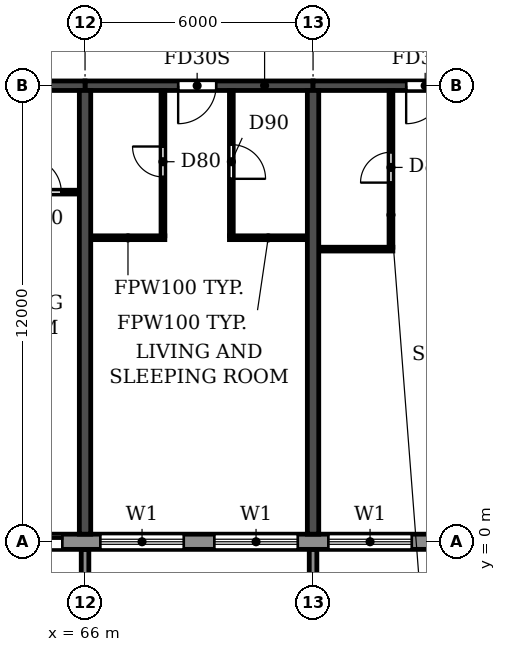
"""IFC4 building model, lengths in metres.
Left out: names, types, materials, properties, quantities, classifications, styles, units other than length and angle.
Written with IfcOpenShell. Run it as: python <this file> out.ifc"""

import sys

from ifc_helpers import new_model, si_unit, direction, frame, frame_2d, origin, place, context, subcontext, project, spatial, polyline, rectangle, outline, extrude, source, transform, mapped, element, fill, save


model = new_model("IFC4")
c1 = context("Model", 3, precision=1e-05, world=origin(), true_north=direction((0.0, 1.0)))
c2 = subcontext(c1, "Body", "Model", "MODEL_VIEW")
j1 = project(units=[si_unit("LENGTHUNIT", "METRE"), si_unit("PLANEANGLEUNIT", "RADIAN")], contexts=[c1])
p1 = place(None, origin())
s1 = spatial("IfcSite", under=j1, at=p1, CompositionType="ELEMENT")
p2 = place(p1, origin())
s2 = spatial("IfcBuilding", under=s1, at=p2, CompositionType="ELEMENT")
p3 = place(p2, frame((0.0, 0.0, 155.4)))
s3 = spatial("IfcBuildingStorey", under=s2, at=p3, CompositionType="ELEMENT", Elevation=155.4)
for number, where, z_axis, x_axis in (
    (1, (66.0, 0.2, 0.0), (0.0, 0.0, 1.0), (0.0, 1.0, 0.0)),
    (2, (72.0, 0.2, 0.0), (0.0, 0.0, 1.0), (0.0, 1.0, 0.0)),
):
    element("IfcWall", number, at=place(p3, frame(where, z_axis=z_axis, x_axis=x_axis)), inside=s3, PredefinedType="SHEAR", context=c2, shape_type="SweptSolid", body=[
        extrude(rectangle(XDim=11.675, YDim=0.3, at=frame_2d((5.837, 0.0))), origin(), (0.0, 0.0, 1.0), 3.0),
    ])
p4 = place(p3, frame((60.0, 12.0, 0.0), z_axis=(0.0, 0.0, 1.0), x_axis=(1.0, 0.0, 0.0)))
e3 = element("IfcWall", 3, at=p4, inside=s3, PredefinedType="SHEAR", context=c2, shape_type="SweptSolid", body=[
    extrude(rectangle(XDim=6.0, YDim=0.25, at=frame_2d((3.0, 0.0))), origin(), (0.0, 0.0, 1.0), 2.4),
])
p5 = place(p4, frame((2.45, 0.0, 0.0)))
e4 = element("IfcOpeningElement", 4, at=p5, cuts=e3, PredefinedType="OPENING", context=c2, shape_type="SweptSolid", body=[
    extrude(rectangle(XDim=1.0, YDim=2.1, at=frame_2d((0.5, 1.05))), frame((0.0, 0.135, 0.0), z_axis=(0.0, -1.0, 0.0), x_axis=(1.0, 0.0, 0.0)), (0.0, 0.0, 1.0), 0.27),
])
p6 = place(p3, frame((66.0, 12.0, 0.0), z_axis=(0.0, 0.0, 1.0), x_axis=(1.0, 0.0, 0.0)))
e5 = element("IfcWall", 5, at=p6, inside=s3, PredefinedType="SHEAR", context=c2, shape_type="SweptSolid", body=[
    extrude(rectangle(XDim=6.0, YDim=0.25, at=frame_2d((3.0, 0.0))), origin(), (0.0, 0.0, 1.0), 2.4),
])
p7 = place(p6, frame((2.45, 0.0, 0.0)))
e6 = element("IfcOpeningElement", 6, at=p7, cuts=e5, PredefinedType="OPENING", context=c2, shape_type="SweptSolid", body=[
    extrude(rectangle(XDim=1.0, YDim=2.1, at=frame_2d((0.5, 1.05))), frame((0.0, 0.135, 0.0), z_axis=(0.0, -1.0, 0.0), x_axis=(1.0, 0.0, 0.0)), (0.0, 0.0, 1.0), 0.27),
])
p8 = place(p3, frame((72.0, 12.0, 0.0), z_axis=(0.0, 0.0, 1.0), x_axis=(1.0, 0.0, 0.0)))
e7 = element("IfcWall", 7, at=p8, inside=s3, PredefinedType="SHEAR", context=c2, shape_type="SweptSolid", body=[
    extrude(rectangle(XDim=6.0, YDim=0.25, at=frame_2d((3.0, 0.0))), origin(), (0.0, 0.0, 1.0), 2.4),
])
p9 = place(p8, frame((2.45, 0.0, 0.0)))
e8 = element("IfcOpeningElement", 8, at=p9, cuts=e7, PredefinedType="OPENING", context=c2, shape_type="SweptSolid", body=[
    extrude(rectangle(XDim=1.0, YDim=2.1, at=frame_2d((0.5, 1.05))), frame((0.0, 0.135, 0.0), z_axis=(0.0, -1.0, 0.0), x_axis=(1.0, 0.0, 0.0)), (0.0, 0.0, 1.0), 0.27),
])
p10 = place(p3, frame((16.683, 0.0, 0.0), z_axis=(0.0, 0.0, 1.0), x_axis=(1.0, 0.0, 0.0)))
e9 = element("IfcWall", 9, at=p10, inside=s3, PredefinedType="STANDARD", context=c2, shape_type="SweptSolid", body=[
    extrude(rectangle(XDim=68.634, YDim=0.4, at=frame_2d((34.317, 0.0))), origin(), (0.0, 0.0, 1.0), 3.0),
])
p11 = place(p10, frame((1.717, 0.0, 0.9)))
e10 = element("IfcOpeningElement", 10, at=p11, cuts=e9, PredefinedType="OPENING", context=c2, shape_type="SweptSolid", body=[
    extrude(rectangle(XDim=2.2, YDim=1.5, at=frame_2d((1.1, 0.75))), frame((0.0, 0.21, 0.0), z_axis=(0.0, -1.0, 0.0), x_axis=(1.0, 0.0, 0.0)), (0.0, 0.0, 1.0), 0.42),
])
p12 = place(p10, frame((4.717, 0.0, 0.9)))
e11 = element("IfcOpeningElement", 11, at=p12, cuts=e9, PredefinedType="OPENING", context=c2, shape_type="SweptSolid", body=[
    extrude(rectangle(XDim=2.2, YDim=1.5, at=frame_2d((1.1, 0.75))), frame((0.0, 0.21, 0.0), z_axis=(0.0, -1.0, 0.0), x_axis=(1.0, 0.0, 0.0)), (0.0, 0.0, 1.0), 0.42),
])
p13 = place(p10, frame((7.917, 0.0, 0.0)))
e12 = element("IfcOpeningElement", 12, at=p13, cuts=e9, PredefinedType="OPENING", context=c2, shape_type="SweptSolid", body=[
    extrude(rectangle(XDim=1.8, YDim=2.4, at=frame_2d((0.9, 1.2))), frame((0.0, 0.21, 0.0), z_axis=(0.0, -1.0, 0.0), x_axis=(1.0, 0.0, 0.0)), (0.0, 0.0, 1.0), 0.42),
])
p14 = place(p10, frame((10.717, 0.0, 0.9)))
e13 = element("IfcOpeningElement", 13, at=p14, cuts=e9, PredefinedType="OPENING", context=c2, shape_type="SweptSolid", body=[
    extrude(rectangle(XDim=2.2, YDim=1.5, at=frame_2d((1.1, 0.75))), frame((0.0, 0.21, 0.0), z_axis=(0.0, -1.0, 0.0), x_axis=(1.0, 0.0, 0.0)), (0.0, 0.0, 1.0), 0.42),
])
p15 = place(p10, frame((13.717, 0.0, 0.9)))
e14 = element("IfcOpeningElement", 14, at=p15, cuts=e9, PredefinedType="OPENING", context=c2, shape_type="SweptSolid", body=[
    extrude(rectangle(XDim=2.2, YDim=1.5, at=frame_2d((1.1, 0.75))), frame((0.0, 0.21, 0.0), z_axis=(0.0, -1.0, 0.0), x_axis=(1.0, 0.0, 0.0)), (0.0, 0.0, 1.0), 0.42),
])
p16 = place(p10, frame((16.717, 0.0, 0.9)))
e15 = element("IfcOpeningElement", 15, at=p16, cuts=e9, PredefinedType="OPENING", context=c2, shape_type="SweptSolid", body=[
    extrude(rectangle(XDim=2.2, YDim=1.5, at=frame_2d((1.1, 0.75))), frame((0.0, 0.21, 0.0), z_axis=(0.0, -1.0, 0.0), x_axis=(1.0, 0.0, 0.0)), (0.0, 0.0, 1.0), 0.42),
])
p17 = place(p10, frame((19.717, 0.0, 0.9)))
e16 = element("IfcOpeningElement", 16, at=p17, cuts=e9, PredefinedType="OPENING", context=c2, shape_type="SweptSolid", body=[
    extrude(rectangle(XDim=2.2, YDim=1.5, at=frame_2d((1.1, 0.75))), frame((0.0, 0.21, 0.0), z_axis=(0.0, -1.0, 0.0), x_axis=(1.0, 0.0, 0.0)), (0.0, 0.0, 1.0), 0.42),
])
p18 = place(p10, frame((22.917, 0.0, 0.0)))
e17 = element("IfcOpeningElement", 17, at=p18, cuts=e9, PredefinedType="OPENING", context=c2, shape_type="SweptSolid", body=[
    extrude(rectangle(XDim=1.8, YDim=2.4, at=frame_2d((0.9, 1.2))), frame((0.0, 0.21, 0.0), z_axis=(0.0, -1.0, 0.0), x_axis=(1.0, 0.0, 0.0)), (0.0, 0.0, 1.0), 0.42),
])
p19 = place(p10, frame((25.717, 0.0, 0.9)))
e18 = element("IfcOpeningElement", 18, at=p19, cuts=e9, PredefinedType="OPENING", context=c2, shape_type="SweptSolid", body=[
    extrude(rectangle(XDim=2.2, YDim=1.5, at=frame_2d((1.1, 0.75))), frame((0.0, 0.21, 0.0), z_axis=(0.0, -1.0, 0.0), x_axis=(1.0, 0.0, 0.0)), (0.0, 0.0, 1.0), 0.42),
])
p20 = place(p10, frame((28.717, 0.0, 0.9)))
e19 = element("IfcOpeningElement", 19, at=p20, cuts=e9, PredefinedType="OPENING", context=c2, shape_type="SweptSolid", body=[
    extrude(rectangle(XDim=2.2, YDim=1.5, at=frame_2d((1.1, 0.75))), frame((0.0, 0.21, 0.0), z_axis=(0.0, -1.0, 0.0), x_axis=(1.0, 0.0, 0.0)), (0.0, 0.0, 1.0), 0.42),
])
p21 = place(p10, frame((31.917, 0.0, 0.0)))
e20 = element("IfcOpeningElement", 20, at=p21, cuts=e9, PredefinedType="OPENING", context=c2, shape_type="SweptSolid", body=[
    extrude(rectangle(XDim=1.8, YDim=2.4, at=frame_2d((0.9, 1.2))), frame((0.0, 0.21, 0.0), z_axis=(0.0, -1.0, 0.0), x_axis=(1.0, 0.0, 0.0)), (0.0, 0.0, 1.0), 0.42),
])
p22 = place(p10, frame((34.717, 0.0, 0.9)))
e21 = element("IfcOpeningElement", 21, at=p22, cuts=e9, PredefinedType="OPENING", context=c2, shape_type="SweptSolid", body=[
    extrude(rectangle(XDim=2.2, YDim=1.5, at=frame_2d((1.1, 0.75))), frame((0.0, 0.21, 0.0), z_axis=(0.0, -1.0, 0.0), x_axis=(1.0, 0.0, 0.0)), (0.0, 0.0, 1.0), 0.42),
])
p23 = place(p10, frame((37.717, 0.0, 0.9)))
e22 = element("IfcOpeningElement", 22, at=p23, cuts=e9, PredefinedType="OPENING", context=c2, shape_type="SweptSolid", body=[
    extrude(rectangle(XDim=2.2, YDim=1.5, at=frame_2d((1.1, 0.75))), frame((0.0, 0.21, 0.0), z_axis=(0.0, -1.0, 0.0), x_axis=(1.0, 0.0, 0.0)), (0.0, 0.0, 1.0), 0.42),
])
p24 = place(p10, frame((40.717, 0.0, 0.9)))
e23 = element("IfcOpeningElement", 23, at=p24, cuts=e9, PredefinedType="OPENING", context=c2, shape_type="SweptSolid", body=[
    extrude(rectangle(XDim=2.2, YDim=1.5, at=frame_2d((1.1, 0.75))), frame((0.0, 0.21, 0.0), z_axis=(0.0, -1.0, 0.0), x_axis=(1.0, 0.0, 0.0)), (0.0, 0.0, 1.0), 0.42),
])
p25 = place(p10, frame((43.717, 0.0, 0.9)))
e24 = element("IfcOpeningElement", 24, at=p25, cuts=e9, PredefinedType="OPENING", context=c2, shape_type="SweptSolid", body=[
    extrude(rectangle(XDim=2.2, YDim=1.5, at=frame_2d((1.1, 0.75))), frame((0.0, 0.21, 0.0), z_axis=(0.0, -1.0, 0.0), x_axis=(1.0, 0.0, 0.0)), (0.0, 0.0, 1.0), 0.42),
])
p26 = place(p10, frame((46.917, 0.0, 0.0)))
e25 = element("IfcOpeningElement", 25, at=p26, cuts=e9, PredefinedType="OPENING", context=c2, shape_type="SweptSolid", body=[
    extrude(rectangle(XDim=1.8, YDim=2.4, at=frame_2d((0.9, 1.2))), frame((0.0, 0.21, 0.0), z_axis=(0.0, -1.0, 0.0), x_axis=(1.0, 0.0, 0.0)), (0.0, 0.0, 1.0), 0.42),
])
p27 = place(p10, frame((49.717, 0.0, 0.9)))
e26 = element("IfcOpeningElement", 26, at=p27, cuts=e9, PredefinedType="OPENING", context=c2, shape_type="SweptSolid", body=[
    extrude(rectangle(XDim=2.2, YDim=1.5, at=frame_2d((1.1, 0.75))), frame((0.0, 0.21, 0.0), z_axis=(0.0, -1.0, 0.0), x_axis=(1.0, 0.0, 0.0)), (0.0, 0.0, 1.0), 0.42),
])
p28 = place(p10, frame((52.717, 0.0, 0.9)))
e27 = element("IfcOpeningElement", 27, at=p28, cuts=e9, PredefinedType="OPENING", context=c2, shape_type="SweptSolid", body=[
    extrude(rectangle(XDim=2.2, YDim=1.5, at=frame_2d((1.1, 0.75))), frame((0.0, 0.21, 0.0), z_axis=(0.0, -1.0, 0.0), x_axis=(1.0, 0.0, 0.0)), (0.0, 0.0, 1.0), 0.42),
])
p29 = place(p10, frame((55.717, 0.0, 0.9)))
e28 = element("IfcOpeningElement", 28, at=p29, cuts=e9, PredefinedType="OPENING", context=c2, shape_type="SweptSolid", body=[
    extrude(rectangle(XDim=2.2, YDim=1.5, at=frame_2d((1.1, 0.75))), frame((0.0, 0.21, 0.0), z_axis=(0.0, -1.0, 0.0), x_axis=(1.0, 0.0, 0.0)), (0.0, 0.0, 1.0), 0.42),
])
p30 = place(p10, frame((58.917, 0.0, 0.0)))
e29 = element("IfcOpeningElement", 29, at=p30, cuts=e9, PredefinedType="OPENING", context=c2, shape_type="SweptSolid", body=[
    extrude(rectangle(XDim=1.8, YDim=2.4, at=frame_2d((0.9, 1.2))), frame((0.0, 0.21, 0.0), z_axis=(0.0, -1.0, 0.0), x_axis=(1.0, 0.0, 0.0)), (0.0, 0.0, 1.0), 0.42),
])
p31 = place(p10, frame((61.717, 0.0, 0.9)))
e30 = element("IfcOpeningElement", 30, at=p31, cuts=e9, PredefinedType="OPENING", context=c2, shape_type="SweptSolid", body=[
    extrude(rectangle(XDim=2.2, YDim=1.5, at=frame_2d((1.1, 0.75))), frame((0.0, 0.21, 0.0), z_axis=(0.0, -1.0, 0.0), x_axis=(1.0, 0.0, 0.0)), (0.0, 0.0, 1.0), 0.42),
])
p32 = place(p10, frame((64.717, 0.0, 0.9)))
e31 = element("IfcOpeningElement", 31, at=p32, cuts=e9, PredefinedType="OPENING", context=c2, shape_type="SweptSolid", body=[
    extrude(rectangle(XDim=2.2, YDim=1.5, at=frame_2d((1.1, 0.75))), frame((0.0, 0.21, 0.0), z_axis=(0.0, -1.0, 0.0), x_axis=(1.0, 0.0, 0.0)), (0.0, 0.0, 1.0), 0.42),
])
m1 = source(origin(), c2, "Body", "SweptSolid", [
    extrude(outline(polyline([(0.0, 0.0), (0.2, 0.0), (0.2, 1.65), (0.0, 1.65), (0.0, 0.0)])), origin(), (0.0, 0.0, 1.0), 3.1),
])
for number, where in (
    (32, (65.9, -1.85, 0.0)),
    (33, (71.9, -1.85, 0.0)),
):
    element("IfcWall", number, at=place(p3, frame(where)), inside=s3, PredefinedType="STANDARD", context=c2, shape_type="MappedRepresentation", body=[
        mapped(m1, transform((0.0, 0.0, 0.0))),
    ])
for number, where, z_axis, x_axis in (
    (34, (72.16, 7.7, 0.0), (0.0, 0.0, 1.0), (1.0, 0.0, 0.0)),
    (35, (66.16, 8.0, 0.0), (0.0, 0.0, 1.0), (1.0, 0.0, 0.0)),
):
    element("IfcWall", number, at=place(p3, frame(where, z_axis=z_axis, x_axis=x_axis)), inside=s3, PredefinedType="PARTITIONING", context=c2, shape_type="SweptSolid", body=[
        extrude(rectangle(XDim=1.94, YDim=0.1, at=frame_2d((0.97, 0.0))), origin(), (0.0, 0.0, 1.0), 3.0),
    ])
p33 = place(p3, frame((69.8, 8.0, 0.0), z_axis=(0.0, 0.0, 1.0), x_axis=(1.0, 0.0, 0.0)))
e36 = element("IfcWall", 36, at=p33, inside=s3, PredefinedType="PARTITIONING", context=c2, shape_type="SweptSolid", body=[
    extrude(rectangle(XDim=2.04, YDim=0.1, at=frame_2d((1.02, 0.0))), origin(), (0.0, 0.0, 1.0), 3.0),
])
p34 = place(p3, frame((63.8, 9.2, 0.0), z_axis=(0.0, 0.0, 1.0), x_axis=(1.0, 0.0, 0.0)))
e37 = element("IfcWall", 37, at=p34, inside=s3, PredefinedType="PARTITIONING", context=c2, shape_type="SweptSolid", body=[
    extrude(rectangle(XDim=2.04, YDim=0.1, at=frame_2d((1.02, 0.0))), origin(), (0.0, 0.0, 1.0), 3.0),
])
p35 = place(p34, frame((0.675, 0.0, 0.0)))
e38 = element("IfcOpeningElement", 38, at=p35, cuts=e37, PredefinedType="OPENING", context=c2, shape_type="SweptSolid", body=[
    extrude(rectangle(XDim=0.9, YDim=2.1, at=frame_2d((0.45, 1.05))), frame((0.0, 0.06, 0.0), z_axis=(0.0, -1.0, 0.0), x_axis=(1.0, 0.0, 0.0)), (0.0, 0.0, 1.0), 0.12),
])
p36 = place(p3, frame((68.05, 8.05, 0.0), z_axis=(0.0, 0.0, 1.0), x_axis=(0.0, 1.0, 0.0)))
e39 = element("IfcWall", 39, at=p36, inside=s3, PredefinedType="PARTITIONING", context=c2, shape_type="SweptSolid", body=[
    extrude(rectangle(XDim=3.815, YDim=0.1, at=frame_2d((1.907, 0.0))), origin(), (0.0, 0.0, 1.0), 3.0),
])
p37 = place(p36, frame((1.55, 0.0, 0.0)))
e40 = element("IfcOpeningElement", 40, at=p37, cuts=e39, PredefinedType="OPENING", context=c2, shape_type="SweptSolid", body=[
    extrude(rectangle(XDim=0.8, YDim=2.1, at=frame_2d((0.4, 1.05))), frame((0.0, 0.06, 0.0), z_axis=(0.0, -1.0, 0.0), x_axis=(1.0, 0.0, 0.0)), (0.0, 0.0, 1.0), 0.12),
])
p38 = place(p3, frame((69.85, 8.05, 0.0), z_axis=(0.0, 0.0, 1.0), x_axis=(0.0, 1.0, 0.0)))
e41 = element("IfcWall", 41, at=p38, inside=s3, PredefinedType="PARTITIONING", context=c2, shape_type="SweptSolid", body=[
    extrude(rectangle(XDim=3.815, YDim=0.1, at=frame_2d((1.907, 0.0))), origin(), (0.0, 0.0, 1.0), 3.0),
])
p39 = place(p38, frame((1.5, 0.0, 0.0)))
e42 = element("IfcOpeningElement", 42, at=p39, cuts=e41, PredefinedType="OPENING", context=c2, shape_type="SweptSolid", body=[
    extrude(rectangle(XDim=0.9, YDim=2.1, at=frame_2d((0.45, 1.05))), frame((0.0, 0.06, 0.0), z_axis=(0.0, -1.0, 0.0), x_axis=(1.0, 0.0, 0.0)), (0.0, 0.0, 1.0), 0.12),
])
p40 = place(p3, frame((74.05, 7.75, 0.0), z_axis=(0.0, 0.0, 1.0), x_axis=(0.0, 1.0, 0.0)))
e43 = element("IfcWall", 43, at=p40, inside=s3, PredefinedType="PARTITIONING", context=c2, shape_type="SweptSolid", body=[
    extrude(rectangle(XDim=4.115, YDim=0.1, at=frame_2d((2.058, 0.0))), origin(), (0.0, 0.0, 1.0), 3.0),
])
p41 = place(p40, frame((1.7, 0.0, 0.0)))
e44 = element("IfcOpeningElement", 44, at=p41, cuts=e43, PredefinedType="OPENING", context=c2, shape_type="SweptSolid", body=[
    extrude(rectangle(XDim=0.8, YDim=2.1, at=frame_2d((0.4, 1.05))), frame((0.0, 0.06, 0.0), z_axis=(0.0, -1.0, 0.0), x_axis=(1.0, 0.0, 0.0)), (0.0, 0.0, 1.0), 0.12),
])
p42 = place(p26, origin())
e45 = element("IfcDoor", 45, at=p42, inside=s3, OperationType="DOUBLE_DOOR_SLIDING", PredefinedType="DOOR", context=c2, shape_type="SweptSolid", body=[
    extrude(rectangle(XDim=1.8, YDim=2.4, at=frame_2d((0.9, 1.2))), frame((0.0, 0.025, 0.0), z_axis=(0.0, -1.0, 0.0), x_axis=(1.0, 0.0, 0.0)), (0.0, 0.0, 1.0), 0.05),
])
fill(e25, e45)
p43 = place(p27, origin())
e46 = element("IfcWindow", 46, at=p43, inside=s3, PartitioningType="DOUBLE_PANEL_HORIZONTAL", PredefinedType="WINDOW", context=c2, shape_type="SweptSolid", body=[
    extrude(rectangle(XDim=2.2, YDim=1.5, at=frame_2d((1.1, 0.75))), frame((0.0, 0.03, 0.0), z_axis=(0.0, -1.0, 0.0), x_axis=(1.0, 0.0, 0.0)), (0.0, 0.0, 1.0), 0.06),
])
fill(e26, e46)
p44 = place(p28, origin())
e47 = element("IfcWindow", 47, at=p44, inside=s3, PartitioningType="DOUBLE_PANEL_HORIZONTAL", PredefinedType="WINDOW", context=c2, shape_type="SweptSolid", body=[
    extrude(rectangle(XDim=2.2, YDim=1.5, at=frame_2d((1.1, 0.75))), frame((0.0, 0.03, 0.0), z_axis=(0.0, -1.0, 0.0), x_axis=(1.0, 0.0, 0.0)), (0.0, 0.0, 1.0), 0.06),
])
fill(e27, e47)
p45 = place(p29, origin())
e48 = element("IfcWindow", 48, at=p45, inside=s3, PartitioningType="DOUBLE_PANEL_HORIZONTAL", PredefinedType="WINDOW", context=c2, shape_type="SweptSolid", body=[
    extrude(rectangle(XDim=2.2, YDim=1.5, at=frame_2d((1.1, 0.75))), frame((0.0, 0.03, 0.0), z_axis=(0.0, -1.0, 0.0), x_axis=(1.0, 0.0, 0.0)), (0.0, 0.0, 1.0), 0.06),
])
fill(e28, e48)
p46 = place(p35, origin())
e49 = element("IfcDoor", 49, at=p46, inside=s3, OperationType="SINGLE_SWING_LEFT", PredefinedType="DOOR", context=c2, shape_type="SweptSolid", body=[
    extrude(rectangle(XDim=0.9, YDim=2.1, at=frame_2d((0.45, 1.05))), frame((0.0, 0.025, 0.0), z_axis=(0.0, -1.0, 0.0), x_axis=(1.0, 0.0, 0.0)), (0.0, 0.0, 1.0), 0.05),
])
fill(e38, e49)
p47 = place(p37, origin())
e50 = element("IfcDoor", 50, at=p47, inside=s3, OperationType="SINGLE_SWING_RIGHT", PredefinedType="DOOR", context=c2, shape_type="SweptSolid", body=[
    extrude(rectangle(XDim=0.8, YDim=2.1, at=frame_2d((0.4, 1.05))), frame((0.0, 0.025, 0.0), z_axis=(0.0, -1.0, 0.0), x_axis=(1.0, 0.0, 0.0)), (0.0, 0.0, 1.0), 0.05),
])
fill(e40, e50)
p48 = place(p7, frame((1.0, 0.0, 0.0), z_axis=(0.0, 0.0, 1.0), x_axis=(-1.0, 0.0, 0.0)))
e51 = element("IfcDoor", 51, at=p48, inside=s3, OperationType="SINGLE_SWING_RIGHT", PredefinedType="DOOR", context=c2, shape_type="SweptSolid", body=[
    extrude(rectangle(XDim=1.0, YDim=2.1, at=frame_2d((0.5, 1.05))), frame((0.0, 0.025, 0.0), z_axis=(0.0, -1.0, 0.0), x_axis=(1.0, 0.0, 0.0)), (0.0, 0.0, 1.0), 0.05),
])
fill(e6, e51)
p49 = place(p39, frame((0.9, 0.0, 0.0), z_axis=(0.0, 0.0, 1.0), x_axis=(-1.0, 0.0, 0.0)))
e52 = element("IfcDoor", 52, at=p49, inside=s3, OperationType="SINGLE_SWING_RIGHT", PredefinedType="DOOR", context=c2, shape_type="SweptSolid", body=[
    extrude(rectangle(XDim=0.9, YDim=2.1, at=frame_2d((0.45, 1.05))), frame((0.0, 0.025, 0.0), z_axis=(0.0, -1.0, 0.0), x_axis=(1.0, 0.0, 0.0)), (0.0, 0.0, 1.0), 0.05),
])
fill(e42, e52)
p50 = place(p41, origin())
e53 = element("IfcDoor", 53, at=p50, inside=s3, OperationType="SINGLE_SWING_LEFT", PredefinedType="DOOR", context=c2, shape_type="SweptSolid", body=[
    extrude(rectangle(XDim=0.8, YDim=2.1, at=frame_2d((0.4, 1.05))), frame((0.0, 0.025, 0.0), z_axis=(0.0, -1.0, 0.0), x_axis=(1.0, 0.0, 0.0)), (0.0, 0.0, 1.0), 0.05),
])
fill(e44, e53)
p51 = place(p9, frame((1.0, 0.0, 0.0), z_axis=(0.0, 0.0, 1.0), x_axis=(-1.0, 0.0, 0.0)))
e54 = element("IfcDoor", 54, at=p51, inside=s3, OperationType="SINGLE_SWING_RIGHT", PredefinedType="DOOR", context=c2, shape_type="SweptSolid", body=[
    extrude(rectangle(XDim=1.0, YDim=2.1, at=frame_2d((0.5, 1.05))), frame((0.0, 0.025, 0.0), z_axis=(0.0, -1.0, 0.0), x_axis=(1.0, 0.0, 0.0)), (0.0, 0.0, 1.0), 0.05),
])
fill(e8, e54)
save(model, sys.argv[1])
